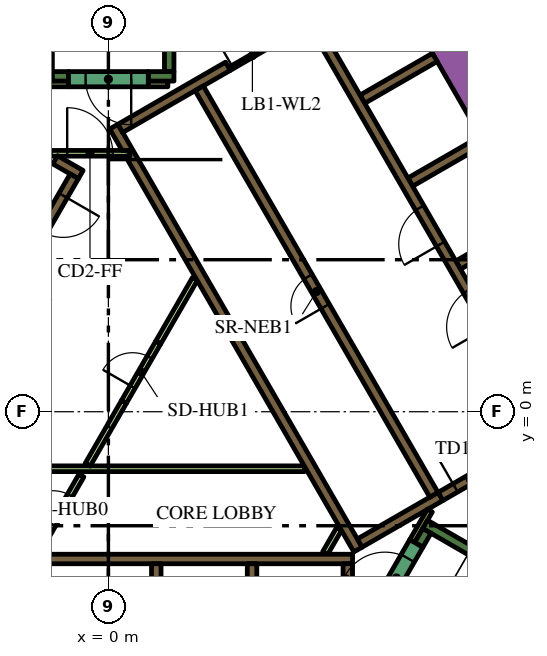
"""IFC4 building model, lengths in metres.
Left out: names, types, materials, properties, quantities, classifications, styles, units other than length and angle.
Written with IfcOpenShell. Run it as: python <this file> out.ifc"""

import sys

from ifc_helpers import new_model, si_unit, direction, frame, frame_2d, origin, place, context, subcontext, project, spatial, polyline, rectangle, outline, extrude, element, fill, save


model = new_model("IFC4")
c1 = context("Model", 3, precision=1e-05, world=origin(), true_north=direction((0.0, 1.0)))
c2 = subcontext(c1, "Body", "Model", "MODEL_VIEW")
j1 = project(units=[si_unit("LENGTHUNIT", "METRE"), si_unit("PLANEANGLEUNIT", "RADIAN")], contexts=[c1])
p1 = place(None, origin())
s1 = spatial("IfcSite", under=j1, at=p1, CompositionType="ELEMENT")
p2 = place(p1, origin())
s2 = spatial("IfcBuilding", under=s1, at=p2, CompositionType="ELEMENT")
p3 = place(p2, frame((0.0, 0.0, 91.5)))
s3 = spatial("IfcBuildingStorey", under=s2, at=p3, CompositionType="ELEMENT", Elevation=91.5)
p4 = place(p3, frame((6.776, 13.364, 0.0), z_axis=(0.0, 0.0, 1.0), x_axis=(0.500004177138, -0.8660229921, 0.0)))
e1 = element("IfcWall", 1, at=p4, inside=s3, PredefinedType="SOLIDWALL", context=c2, shape_type="SweptSolid", body=[
    extrude(rectangle(XDim=20.204, YDim=0.9, at=frame_2d((10.102, 0.0))), origin(), (0.0, 0.0, 1.0), 3.9),
])
p5 = place(p3, frame((8.334, -2.964, 0.0), z_axis=(0.0, 0.0, 1.0), x_axis=(0.866016039709, -0.500016218704, 0.0)))
e2 = element("IfcWall", 2, at=p5, inside=s3, PredefinedType="SOLIDWALL", context=c2, shape_type="SweptSolid", body=[
    extrude(rectangle(XDim=7.05, YDim=0.25, at=frame_2d((3.525, 0.0))), origin(), (0.0, 0.0, 1.0), 3.9),
])
p6 = place(p3, frame((8.168, -3.503, 0.0), z_axis=(0.0, 0.0, 1.0), x_axis=(0.49972245349, 0.866185586049, 0.0)))
e3 = element("IfcWall", 3, at=p6, inside=s3, PredefinedType="SOLIDWALL", context=c2, shape_type="SweptSolid", body=[
    extrude(rectangle(XDim=0.425, YDim=0.25, at=frame_2d((0.212, 0.0))), origin(), (0.0, 0.0, 1.0), 3.9),
])
p7 = place(p3, frame((1.6, 8.95, 0.0), z_axis=(0.0, 0.0, 1.0), x_axis=(0.0, 1.0, 0.0)))
e4 = element("IfcWall", 4, at=p7, inside=s3, PredefinedType="SOLIDWALL", context=c2, shape_type="SweptSolid", body=[
    extrude(rectangle(XDim=6.8, YDim=0.25, at=frame_2d((3.4, 0.0))), origin(), (0.0, 0.0, 1.0), 3.9),
])
p8 = place(p3, frame((1.05, 8.825, 0.0), z_axis=(0.0, 0.0, 1.0), x_axis=(1.0, 0.0, 0.0)))
e5 = element("IfcWall", 5, at=p8, inside=s3, PredefinedType="SOLIDWALL", context=c2, shape_type="SweptSolid", body=[
    extrude(rectangle(XDim=0.675, YDim=0.25, at=frame_2d((0.337, 0.0))), origin(), (0.0, 0.0, 1.0), 3.9),
])
p9 = place(p3, frame((-1.6, 8.7, 0.0), z_axis=(0.0, 0.0, 1.0), x_axis=(0.0, 1.0, 0.0)))
e6 = element("IfcWall", 6, at=p9, inside=s3, PredefinedType="SOLIDWALL", context=c2, shape_type="SweptSolid", body=[
    extrude(rectangle(XDim=7.05, YDim=0.25, at=frame_2d((3.525, 0.0))), origin(), (0.0, 0.0, 1.0), 3.9),
])
p10 = place(p3, frame((-1.475, 8.825, 0.0), z_axis=(0.0, 0.0, 1.0), x_axis=(1.0, 0.0, 0.0)))
e7 = element("IfcWall", 7, at=p10, inside=s3, PredefinedType="SOLIDWALL", context=c2, shape_type="SweptSolid", body=[
    extrude(rectangle(XDim=0.425, YDim=0.25, at=frame_2d((0.212, 0.0))), origin(), (0.0, 0.0, 1.0), 3.9),
])
p11 = place(p3, frame((-5.545, -3.875, 0.0), z_axis=(0.0, 0.0, 1.0), x_axis=(1.0, 0.0, 0.0)))
e8 = element("IfcWall", 8, at=p11, inside=s3, PredefinedType="SOLIDWALL", context=c2, shape_type="SweptSolid", body=[
    extrude(rectangle(XDim=11.97, YDim=0.25, at=frame_2d((5.985, 0.0))), origin(), (0.0, 0.0, 1.0), 3.9),
])
p12 = place(p3, frame((6.3, -7.268, 0.0), z_axis=(0.0, 0.0, 1.0), x_axis=(0.0, 1.0, 0.0)))
e9 = element("IfcWall", 9, at=p12, inside=s3, PredefinedType="SOLIDWALL", context=c2, shape_type="SweptSolid", body=[
    extrude(rectangle(XDim=3.268, YDim=0.25, at=frame_2d((1.634, 0.0))), origin(), (0.0, 0.0, 1.0), 3.9),
])
for number, where, z_axis, x_axis in (
    (10, (3.78, -4.0, 0.0), (0.0, 0.0, 1.0), (0.0, -1.0, 0.0)),
    (11, (1.26, -4.0, 0.0), (0.0, 0.0, 1.0), (0.0, -1.0, 0.0)),
):
    element("IfcWall", number, at=place(p3, frame(where, z_axis=z_axis, x_axis=x_axis)), inside=s3, PredefinedType="SOLIDWALL", context=c2, shape_type="SweptSolid", body=[
        extrude(rectangle(XDim=2.2, YDim=0.25, at=frame_2d((1.1, 0.0))), origin(), (0.0, 0.0, 1.0), 3.9),
    ])
p13 = place(p3, origin())
e12 = element("IfcWall", 12, at=p13, inside=s3, PredefinedType="SOLIDWALL", context=c2, shape_type="SweptSolid", body=[
    extrude(outline(polyline([(0.566, 6.725), (0.566, 6.875), (0.566, 6.875), (0.565, 6.875), (0.361, 6.875), (0.035, 7.439), (0.252, 7.564), (0.377, 7.348), (6.552, -3.348), (6.677, -3.564), (6.46, -3.689), (0.448, 6.725), (0.565, 6.725), (0.566, 6.725), (0.566, 6.725)])), origin(), (0.0, 0.0, 1.0), 3.9),
])
p14 = place(p3, frame((0.314, 7.456, 0.0), z_axis=(0.0, 0.0, 1.0), x_axis=(0.866013897511, 0.50001992892, 0.0)))
e13 = element("IfcWall", 13, at=p14, inside=s3, PredefinedType="SOLIDWALL", context=c2, shape_type="SweptSolid", body=[
    extrude(rectangle(XDim=3.268, YDim=0.25, at=frame_2d((1.634, 0.0))), origin(), (0.0, 0.0, 1.0), 3.9),
])
p15 = place(p3, frame((6.614, -3.456, 0.0), z_axis=(0.0, 0.0, 1.0), x_axis=(0.866031582473, 0.499989298045, 0.0)))
e14 = element("IfcWall", 14, at=p15, inside=s3, PredefinedType="SOLIDWALL", context=c2, shape_type="SweptSolid", body=[
    extrude(rectangle(XDim=2.455, YDim=0.25, at=frame_2d((1.228, 0.0))), origin(), (0.0, 0.0, 1.0), 3.9),
])
for number, where, z_axis, x_axis in (
    (15, (6.684, 8.224, 0.0), (0.0, 0.0, 1.0), (0.866, 0.5, 0.0)),
    (16, (7.944, 6.041, 0.0), (0.0, 0.0, 1.0), (0.866, 0.5, 0.0)),
    (17, (9.204, 3.859, 0.0), (0.0, 0.0, 1.0), (0.866, 0.5, 0.0)),
):
    element("IfcWall", number, at=place(p3, frame(where, z_axis=z_axis, x_axis=x_axis)), inside=s3, PredefinedType="SOLIDWALL", context=c2, shape_type="SweptSolid", body=[
        extrude(rectangle(XDim=2.2, YDim=0.25, at=frame_2d((1.1, 0.0))), origin(), (0.0, 0.0, 1.0), 3.9),
    ])
p16 = place(p3, frame((-0.728, 6.24, 0.0), z_axis=(0.0, 0.0, 1.0), x_axis=(-0.865955664968, 0.500120771724, 0.0)))
e18 = element("IfcWall", 18, at=p16, inside=s3, PredefinedType="SOLIDWALL", context=c2, shape_type="SweptSolid", body=[
    extrude(rectangle(XDim=0.778, YDim=0.25, at=frame_2d((0.389, 0.0))), origin(), (0.0, 0.0, 1.0), 3.9),
])
p17 = place(p3, frame((-2.196, 8.625, 0.0), z_axis=(0.0, 0.0, 1.0), x_axis=(1.0, 0.0, 0.0)))
e19 = element("IfcWall", 19, at=p17, inside=s3, PredefinedType="PARTITIONING", context=c2, shape_type="SweptSolid", body=[
    extrude(rectangle(XDim=1.146, YDim=0.15, at=frame_2d((0.573, 0.0))), origin(), (0.0, 0.0, 1.0), 2.75),
])
p18 = place(p3, frame((5.705, -3.718, 0.0), z_axis=(0.0, 0.0, 1.0), x_axis=(0.499962090823, 0.866047289552, 0.0)))
e20 = element("IfcWall", 20, at=p18, inside=s3, PredefinedType="PARTITIONING", context=c2, shape_type="SweptSolid", body=[
    extrude(rectangle(XDim=0.735, YDim=0.15, at=frame_2d((0.367, 0.0))), origin(), (0.0, 0.0, 1.0), 2.75),
])
p19 = place(p3, frame((8.459, -2.599, 0.0), z_axis=(0.0, 0.0, 1.0), x_axis=(-0.500041054325, -0.866001699761, 0.0)))
e21 = element("IfcWall", 21, at=p19, inside=s3, PredefinedType="PARTITIONING", context=c2, shape_type="SweptSolid", body=[
    extrude(rectangle(XDim=0.929, YDim=0.15, at=frame_2d((0.464, 0.0))), origin(), (0.0, 0.0, 1.0), 3.9),
])
p20 = place(p3, frame((-4.2, -1.5, 0.0), z_axis=(0.0, 0.0, 1.0), x_axis=(1.0, 0.0, 0.0)))
e22 = element("IfcWall", 22, at=p20, inside=s3, PredefinedType="PARTITIONING", context=c2, shape_type="SweptSolid", body=[
    extrude(rectangle(XDim=9.359, YDim=0.15, at=frame_2d((4.68, 0.0))), origin(), (0.0, 0.0, 1.0), 2.75),
])
p21 = place(p3, frame((-0.544, -1.393, 0.0), z_axis=(0.0, 0.0, 1.0), x_axis=(0.499928740635, 0.866066541489, 0.0)))
e23 = element("IfcWall", 23, at=p21, inside=s3, PredefinedType="PARTITIONING", context=c2, shape_type="SweptSolid", body=[
    extrude(rectangle(XDim=1.912, YDim=0.15, at=frame_2d((0.956, 0.0))), origin(), (0.0, 0.0, 1.0), 2.75),
])
p22 = place(p3, frame((1.312, 1.822, 0.0), z_axis=(0.0, 0.0, 1.0), x_axis=(0.500003549559, 0.866023354436, 0.0)))
e24 = element("IfcWall", 24, at=p22, inside=s3, PredefinedType="PARTITIONING", context=c2, shape_type="SweptSolid", body=[
    extrude(rectangle(XDim=1.93, YDim=0.15, at=frame_2d((0.965, 0.0))), origin(), (0.0, 0.0, 1.0), 2.75),
])
p23 = place(p3, frame((1.05, 8.625, 0.0), z_axis=(0.0, 0.0, 1.0), x_axis=(1.0, 0.0, 0.0)))
e25 = element("IfcWall", 25, at=p23, inside=s3, PredefinedType="PARTITIONING", context=c2, shape_type="SweptSolid", body=[
    extrude(rectangle(XDim=0.514, YDim=0.15, at=frame_2d((0.257, 0.0))), origin(), (0.0, 0.0, 1.0), 2.75),
])
p24 = place(p3, frame((11.553, -0.46, 0.0), z_axis=(0.0, 0.0, 1.0), x_axis=(-0.500006514828, 0.866021642414, 0.0)))
e26 = element("IfcWall", 26, at=p24, inside=s3, PredefinedType="SOLIDWALL", context=c2, shape_type="SweptSolid", body=[
    extrude(rectangle(XDim=12.35, YDim=0.25, at=frame_2d((6.175, 0.0))), origin(), (0.0, 0.0, 1.0), 3.9),
])
p25 = place(p24, frame((0.585, 0.0, 0.0)))
e27 = element("IfcOpeningElement", 27, at=p25, cuts=e26, PredefinedType="OPENING", context=c2, shape_type="SweptSolid", body=[
    extrude(rectangle(XDim=1.1, YDim=2.1, at=frame_2d((0.55, 1.05))), frame((0.0, 0.135, 0.0), z_axis=(0.0, -1.0, 0.0), x_axis=(1.0, 0.0, 0.0)), (0.0, 0.0, 1.0), 0.27),
])
p26 = place(p24, frame((3.105, 0.0, 0.0)))
e28 = element("IfcOpeningElement", 28, at=p26, cuts=e26, PredefinedType="OPENING", context=c2, shape_type="SweptSolid", body=[
    extrude(rectangle(XDim=1.1, YDim=2.1, at=frame_2d((0.55, 1.05))), frame((0.0, 0.135, 0.0), z_axis=(0.0, -1.0, 0.0), x_axis=(1.0, 0.0, 0.0)), (0.0, 0.0, 1.0), 0.27),
])
p27 = place(p24, frame((5.625, 0.0, 0.0)))
e29 = element("IfcOpeningElement", 29, at=p27, cuts=e26, PredefinedType="OPENING", context=c2, shape_type="SweptSolid", body=[
    extrude(rectangle(XDim=1.1, YDim=2.1, at=frame_2d((0.55, 1.05))), frame((0.0, 0.135, 0.0), z_axis=(0.0, -1.0, 0.0), x_axis=(1.0, 0.0, 0.0)), (0.0, 0.0, 1.0), 0.27),
])
p28 = place(p3, frame((8.565, -2.185, 0.0), z_axis=(0.0, 0.0, 1.0), x_axis=(-0.499997954832, 0.866026584559, 0.0)))
e30 = element("IfcWall", 30, at=p28, inside=s3, PredefinedType="SOLIDWALL", context=c2, shape_type="SweptSolid", body=[
    extrude(rectangle(XDim=12.35, YDim=0.25, at=frame_2d((6.175, 0.0))), origin(), (0.0, 0.0, 1.0), 3.9),
])
p29 = place(p28, frame((5.725, 0.0, 0.0)))
e31 = element("IfcOpeningElement", 31, at=p29, cuts=e30, PredefinedType="OPENING", context=c2, shape_type="SweptSolid", body=[
    extrude(rectangle(XDim=0.9, YDim=2.1, at=frame_2d((0.45, 1.05))), frame((0.0, 0.135, 0.0), z_axis=(0.0, -1.0, 0.0), x_axis=(1.0, 0.0, 0.0)), (0.0, 0.0, 1.0), 0.27),
])
p30 = place(p3, frame((-0.898, 6.194, 0.0), z_axis=(0.0, 0.0, 1.0), x_axis=(-0.499996202215, -0.866027596426, 0.0)))
e32 = element("IfcWall", 32, at=p30, inside=s3, PredefinedType="SOLIDWALL", context=c2, shape_type="SweptSolid", body=[
    extrude(rectangle(XDim=9.83, YDim=0.25, at=frame_2d((4.915, 0.0))), origin(), (0.0, 0.0, 1.0), 3.9),
])
p31 = place(p30, frame((0.585, 0.0, 0.0)))
e33 = element("IfcOpeningElement", 33, at=p31, cuts=e32, PredefinedType="OPENING", context=c2, shape_type="SweptSolid", body=[
    extrude(rectangle(XDim=1.1, YDim=2.1, at=frame_2d((0.55, 1.05))), frame((0.0, 0.135, 0.0), z_axis=(0.0, -1.0, 0.0), x_axis=(1.0, 0.0, 0.0)), (0.0, 0.0, 1.0), 0.27),
])
p32 = place(p30, frame((3.105, 0.0, 0.0)))
e34 = element("IfcOpeningElement", 34, at=p32, cuts=e32, PredefinedType="OPENING", context=c2, shape_type="SweptSolid", body=[
    extrude(rectangle(XDim=1.1, YDim=2.1, at=frame_2d((0.55, 1.05))), frame((0.0, 0.135, 0.0), z_axis=(0.0, -1.0, 0.0), x_axis=(1.0, 0.0, 0.0)), (0.0, 0.0, 1.0), 0.27),
])
p33 = place(p30, frame((5.625, 0.0, 0.0)))
e35 = element("IfcOpeningElement", 35, at=p33, cuts=e32, PredefinedType="OPENING", context=c2, shape_type="SweptSolid", body=[
    extrude(rectangle(XDim=1.1, YDim=2.1, at=frame_2d((0.55, 1.05))), frame((0.0, 0.135, 0.0), z_axis=(0.0, -1.0, 0.0), x_axis=(1.0, 0.0, 0.0)), (0.0, 0.0, 1.0), 0.27),
])
p34 = place(p30, frame((8.145, 0.0, 0.0)))
e36 = element("IfcOpeningElement", 36, at=p34, cuts=e32, PredefinedType="OPENING", context=c2, shape_type="SweptSolid", body=[
    extrude(rectangle(XDim=1.1, YDim=2.1, at=frame_2d((0.55, 1.05))), frame((0.0, 0.135, 0.0), z_axis=(0.0, -1.0, 0.0), x_axis=(1.0, 0.0, 0.0)), (0.0, 0.0, 1.0), 0.27),
])
p35 = place(p3, frame((7.053, -5.284, 0.0), z_axis=(0.0, 0.0, 1.0), x_axis=(0.500078061341, 0.865980330357, 0.0)))
e37 = element("IfcWall", 37, at=p35, inside=s3, PredefinedType="SOLIDWALL", context=c2, shape_type="SweptSolid", body=[
    extrude(rectangle(XDim=2.1, YDim=0.4, at=frame_2d((1.05, 0.0))), origin(), (0.0, 0.0, 1.0), 3.9),
])
p36 = place(p35, frame((0.45, 0.0, 0.0)))
e38 = element("IfcOpeningElement", 38, at=p36, cuts=e37, PredefinedType="OPENING", context=c2, shape_type="SweptSolid", body=[
    extrude(rectangle(XDim=1.2, YDim=2.1, at=frame_2d((0.6, 1.05))), frame((0.0, 0.21, 0.0), z_axis=(0.0, -1.0, 0.0), x_axis=(1.0, 0.0, 0.0)), (0.0, 0.0, 1.0), 0.42),
])
p37 = place(p3, frame((8.74, -2.229, 0.0), z_axis=(0.0, 0.0, 1.0), x_axis=(0.865989075817, 0.500062916607, 0.0)))
e39 = element("IfcWall", 39, at=p37, inside=s3, PredefinedType="SOLIDWALL", context=c2, shape_type="SweptSolid", body=[
    extrude(rectangle(XDim=1.8, YDim=0.25, at=frame_2d((0.9, 0.0))), origin(), (0.0, 0.0, 1.0), 3.9),
])
p38 = place(p37, frame((0.45, 0.0, 0.0)))
e40 = element("IfcOpeningElement", 40, at=p38, cuts=e39, PredefinedType="OPENING", context=c2, shape_type="SweptSolid", body=[
    extrude(rectangle(XDim=0.9, YDim=2.1, at=frame_2d((0.45, 1.05))), frame((0.0, 0.135, 0.0), z_axis=(0.0, -1.0, 0.0), x_axis=(1.0, 0.0, 0.0)), (0.0, 0.0, 1.0), 0.27),
])
p39 = place(p3, frame((1.05, 8.75, 0.0), z_axis=(0.0, 0.0, 1.0), x_axis=(-1.0, 0.0, 0.0)))
e41 = element("IfcWall", 41, at=p39, inside=s3, PredefinedType="SOLIDWALL", context=c2, shape_type="SweptSolid", body=[
    extrude(rectangle(XDim=2.1, YDim=0.4, at=frame_2d((1.05, 0.0))), origin(), (0.0, 0.0, 1.0), 3.9),
])
p40 = place(p39, frame((0.45, 0.0, 0.0)))
e42 = element("IfcOpeningElement", 42, at=p40, cuts=e41, PredefinedType="OPENING", context=c2, shape_type="SweptSolid", body=[
    extrude(rectangle(XDim=1.2, YDim=2.1, at=frame_2d((0.6, 1.05))), frame((0.0, 0.21, 0.0), z_axis=(0.0, -1.0, 0.0), x_axis=(1.0, 0.0, 0.0)), (0.0, 0.0, 1.0), 0.42),
])
p41 = place(p3, frame((-1.76, -3.498, 0.0), z_axis=(0.0, 0.0, 1.0), x_axis=(0.499977374825, 0.866038466041, 0.0)))
e43 = element("IfcWall", 43, at=p41, inside=s3, PredefinedType="PARTITIONING", context=c2, shape_type="SweptSolid", body=[
    extrude(rectangle(XDim=2.1, YDim=0.15, at=frame_2d((1.05, 0.0))), origin(), (0.0, 0.0, 1.0), 2.75),
])
p42 = place(p41, frame((0.6, 0.0, 0.0)))
e44 = element("IfcOpeningElement", 44, at=p42, cuts=e43, PredefinedType="OPENING", context=c2, shape_type="SweptSolid", body=[
    extrude(rectangle(XDim=0.9, YDim=2.1, at=frame_2d((0.45, 1.05))), frame((0.0, 0.085, 0.0), z_axis=(0.0, -1.0, 0.0), x_axis=(1.0, 0.0, 0.0)), (0.0, 0.0, 1.0), 0.17),
])
p43 = place(p3, frame((-1.534, 6.8, 0.0), z_axis=(0.0, 0.0, 1.0), x_axis=(1.0, 0.0, 0.0)))
e45 = element("IfcWall", 45, at=p43, inside=s3, PredefinedType="PARTITIONING", context=c2, shape_type="SweptSolid", body=[
    extrude(rectangle(XDim=2.1, YDim=0.15, at=frame_2d((1.05, 0.0))), origin(), (0.0, 0.0, 1.0), 2.75),
])
p44 = place(p43, frame((0.45, 0.0, 0.0)))
e46 = element("IfcOpeningElement", 46, at=p44, cuts=e45, PredefinedType="OPENING", context=c2, shape_type="SweptSolid", body=[
    extrude(rectangle(XDim=1.2, YDim=2.1, at=frame_2d((0.6, 1.05))), frame((0.0, 0.085, 0.0), z_axis=(0.0, -1.0, 0.0), x_axis=(1.0, 0.0, 0.0)), (0.0, 0.0, 1.0), 0.17),
])
p45 = place(p3, frame((3.183, 9.02, 0.0), z_axis=(0.0, 0.0, 1.0), x_axis=(0.866034573852, 0.49998411664, 0.0)))
e47 = element("IfcWall", 47, at=p45, inside=s3, PredefinedType="PARTITIONING", context=c2, shape_type="SweptSolid", body=[
    extrude(rectangle(XDim=1.4, YDim=0.09, at=frame_2d((0.7, 0.0))), origin(), (0.0, 0.0, 1.0), 2.75),
])
p46 = place(p45, frame((0.1, 0.0, 0.0)))
e48 = element("IfcOpeningElement", 48, at=p46, cuts=e47, PredefinedType="OPENING", context=c2, shape_type="SweptSolid", body=[
    extrude(rectangle(XDim=1.2, YDim=2.1, at=frame_2d((0.6, 1.05))), frame((0.0, 0.055, 0.0), z_axis=(0.0, -1.0, 0.0), x_axis=(1.0, 0.0, 0.0)), (0.0, 0.0, 1.0), 0.11),
])
p47 = place(p3, frame((0.412, 0.263, 0.0), z_axis=(0.0, 0.0, 1.0), x_axis=(0.500062916607, 0.865989075817, 0.0)))
e49 = element("IfcWall", 49, at=p47, inside=s3, PredefinedType="PARTITIONING", context=c2, shape_type="SweptSolid", body=[
    extrude(rectangle(XDim=1.8, YDim=0.15, at=frame_2d((0.9, 0.0))), origin(), (0.0, 0.0, 1.0), 2.75),
])
p48 = place(p47, frame((0.45, 0.0, 0.0)))
e50 = element("IfcOpeningElement", 50, at=p48, cuts=e49, PredefinedType="OPENING", context=c2, shape_type="SweptSolid", body=[
    extrude(rectangle(XDim=0.9, YDim=2.1, at=frame_2d((0.45, 1.05))), frame((0.0, 0.085, 0.0), z_axis=(0.0, -1.0, 0.0), x_axis=(1.0, 0.0, 0.0)), (0.0, 0.0, 1.0), 0.17),
])
p49 = place(p3, frame((6.163, 18.475, 0.0), z_axis=(0.0, 0.0, 1.0), x_axis=(0.500001317485, -0.866024643133, 0.0)))
e51 = element("IfcWall", 51, at=p49, inside=s3, PredefinedType="PARTITIONING", context=c2, shape_type="SweptSolid", body=[
    extrude(rectangle(XDim=25.767, YDim=0.15, at=frame_2d((12.883, 0.0))), origin(), (0.0, 0.0, 1.0), 2.75),
])
p50 = place(p49, frame((24.241, 0.0, 0.0)))
e52 = element("IfcOpeningElement", 52, at=p50, cuts=e51, PredefinedType="OPENING", context=c2, shape_type="SweptSolid", body=[
    extrude(rectangle(XDim=1.0, YDim=2.1, at=frame_2d((0.5, 1.05))), frame((0.0, 0.085, 0.0), z_axis=(0.0, -1.0, 0.0), x_axis=(1.0, 0.0, 0.0)), (0.0, 0.0, 1.0), 0.17),
])
p51 = place(p49, frame((13.144, 0.0, 0.0)))
e53 = element("IfcOpeningElement", 53, at=p51, cuts=e51, PredefinedType="OPENING", context=c2, shape_type="SweptSolid", body=[
    extrude(rectangle(XDim=1.0, YDim=2.1, at=frame_2d((0.5, 1.05))), frame((0.0, 0.085, 0.0), z_axis=(0.0, -1.0, 0.0), x_axis=(1.0, 0.0, 0.0)), (0.0, 0.0, 1.0), 0.17),
])
p52 = place(p49, frame((10.874, 0.0, 0.0)))
e54 = element("IfcOpeningElement", 54, at=p52, cuts=e51, PredefinedType="OPENING", context=c2, shape_type="SweptSolid", body=[
    extrude(rectangle(XDim=0.9, YDim=2.1, at=frame_2d((0.45, 1.05))), frame((0.0, 0.085, 0.0), z_axis=(0.0, -1.0, 0.0), x_axis=(1.0, 0.0, 0.0)), (0.0, 0.0, 1.0), 0.17),
])
p53 = place(p49, frame((3.718, 0.0, 0.0)))
e55 = element("IfcOpeningElement", 55, at=p53, cuts=e51, PredefinedType="OPENING", context=c2, shape_type="SweptSolid", body=[
    extrude(rectangle(XDim=1.1, YDim=2.1, at=frame_2d((0.55, 1.05))), frame((0.0, 0.085, 0.0), z_axis=(0.0, -1.0, 0.0), x_axis=(1.0, 0.0, 0.0)), (0.0, 0.0, 1.0), 0.17),
])
p54 = place(p49, frame((2.411, 0.0, 0.0)))
e56 = element("IfcOpeningElement", 56, at=p54, cuts=e51, PredefinedType="OPENING", context=c2, shape_type="SweptSolid", body=[
    extrude(rectangle(XDim=1.0, YDim=2.1, at=frame_2d((0.5, 1.05))), frame((0.0, 0.085, 0.0), z_axis=(0.0, -1.0, 0.0), x_axis=(1.0, 0.0, 0.0)), (0.0, 0.0, 1.0), 0.17),
])
p55 = place(p26, origin())
e57 = element("IfcDoor", 57, at=p55, inside=s3, OperationType="DOUBLE_DOOR_SLIDING", PredefinedType="DOOR", context=c2, shape_type="SweptSolid", body=[
    extrude(rectangle(XDim=1.1, YDim=2.1, at=frame_2d((0.55, 1.05))), frame((0.0, 0.025, 0.0), z_axis=(0.0, -1.0, 0.0), x_axis=(1.0, 0.0, 0.0)), (0.0, 0.0, 1.0), 0.05),
])
fill(e28, e57)
p56 = place(p27, origin())
e58 = element("IfcDoor", 58, at=p56, inside=s3, OperationType="DOUBLE_DOOR_SLIDING", PredefinedType="DOOR", context=c2, shape_type="SweptSolid", body=[
    extrude(rectangle(XDim=1.1, YDim=2.1, at=frame_2d((0.55, 1.05))), frame((0.0, 0.025, 0.0), z_axis=(0.0, -1.0, 0.0), x_axis=(1.0, 0.0, 0.0)), (0.0, 0.0, 1.0), 0.05),
])
fill(e29, e58)
p57 = place(p29, origin())
e59 = element("IfcDoor", 59, at=p57, inside=s3, OperationType="SINGLE_SWING_LEFT", PredefinedType="DOOR", context=c2, shape_type="SweptSolid", body=[
    extrude(rectangle(XDim=0.9, YDim=2.1, at=frame_2d((0.45, 1.05))), frame((0.0, 0.025, 0.0), z_axis=(0.0, -1.0, 0.0), x_axis=(1.0, 0.0, 0.0)), (0.0, 0.0, 1.0), 0.05),
])
fill(e31, e59)
p58 = place(p31, origin())
e60 = element("IfcDoor", 60, at=p58, inside=s3, OperationType="DOUBLE_DOOR_SLIDING", PredefinedType="DOOR", context=c2, shape_type="SweptSolid", body=[
    extrude(rectangle(XDim=1.1, YDim=2.1, at=frame_2d((0.55, 1.05))), frame((0.0, 0.025, 0.0), z_axis=(0.0, -1.0, 0.0), x_axis=(1.0, 0.0, 0.0)), (0.0, 0.0, 1.0), 0.05),
])
fill(e33, e60)
p59 = place(p36, origin())
e61 = element("IfcDoor", 61, at=p59, inside=s3, OperationType="SINGLE_SWING_LEFT", PredefinedType="DOOR", context=c2, shape_type="SweptSolid", body=[
    extrude(rectangle(XDim=1.2, YDim=2.1, at=frame_2d((0.6, 1.05))), frame((0.0, 0.025, 0.0), z_axis=(0.0, -1.0, 0.0), x_axis=(1.0, 0.0, 0.0)), (0.0, 0.0, 1.0), 0.05),
])
fill(e38, e61)
p60 = place(p38, origin())
e62 = element("IfcDoor", 62, at=p60, inside=s3, OperationType="SINGLE_SWING_LEFT", PredefinedType="DOOR", context=c2, shape_type="SweptSolid", body=[
    extrude(rectangle(XDim=0.9, YDim=2.1, at=frame_2d((0.45, 1.05))), frame((0.0, 0.025, 0.0), z_axis=(0.0, -1.0, 0.0), x_axis=(1.0, 0.0, 0.0)), (0.0, 0.0, 1.0), 0.05),
])
fill(e40, e62)
p61 = place(p40, origin())
e63 = element("IfcDoor", 63, at=p61, inside=s3, OperationType="SINGLE_SWING_LEFT", PredefinedType="DOOR", context=c2, shape_type="SweptSolid", body=[
    extrude(rectangle(XDim=1.2, YDim=2.1, at=frame_2d((0.6, 1.05))), frame((0.0, 0.025, 0.0), z_axis=(0.0, -1.0, 0.0), x_axis=(1.0, 0.0, 0.0)), (0.0, 0.0, 1.0), 0.05),
])
fill(e42, e63)
p62 = place(p42, origin())
e64 = element("IfcDoor", 64, at=p62, inside=s3, OperationType="SINGLE_SWING_LEFT", PredefinedType="DOOR", context=c2, shape_type="SweptSolid", body=[
    extrude(rectangle(XDim=0.9, YDim=2.1, at=frame_2d((0.45, 1.05))), frame((0.0, 0.025, 0.0), z_axis=(0.0, -1.0, 0.0), x_axis=(1.0, 0.0, 0.0)), (0.0, 0.0, 1.0), 0.05),
])
fill(e44, e64)
p63 = place(p44, origin())
e65 = element("IfcDoor", 65, at=p63, inside=s3, OperationType="SINGLE_SWING_LEFT", PredefinedType="DOOR", context=c2, shape_type="SweptSolid", body=[
    extrude(rectangle(XDim=1.2, YDim=2.1, at=frame_2d((0.6, 1.05))), frame((0.0, 0.025, 0.0), z_axis=(0.0, -1.0, 0.0), x_axis=(1.0, 0.0, 0.0)), (0.0, 0.0, 1.0), 0.05),
])
fill(e46, e65)
p64 = place(p46, origin())
e66 = element("IfcDoor", 66, at=p64, inside=s3, OperationType="SINGLE_SWING_LEFT", PredefinedType="DOOR", context=c2, shape_type="SweptSolid", body=[
    extrude(rectangle(XDim=1.2, YDim=2.1, at=frame_2d((0.6, 1.05))), frame((0.0, 0.025, 0.0), z_axis=(0.0, -1.0, 0.0), x_axis=(1.0, 0.0, 0.0)), (0.0, 0.0, 1.0), 0.05),
])
fill(e48, e66)
p65 = place(p48, origin())
e67 = element("IfcDoor", 67, at=p65, inside=s3, OperationType="SINGLE_SWING_LEFT", PredefinedType="DOOR", context=c2, shape_type="SweptSolid", body=[
    extrude(rectangle(XDim=0.9, YDim=2.1, at=frame_2d((0.45, 1.05))), frame((0.0, 0.025, 0.0), z_axis=(0.0, -1.0, 0.0), x_axis=(1.0, 0.0, 0.0)), (0.0, 0.0, 1.0), 0.05),
])
fill(e50, e67)
save(model, sys.argv[1])
